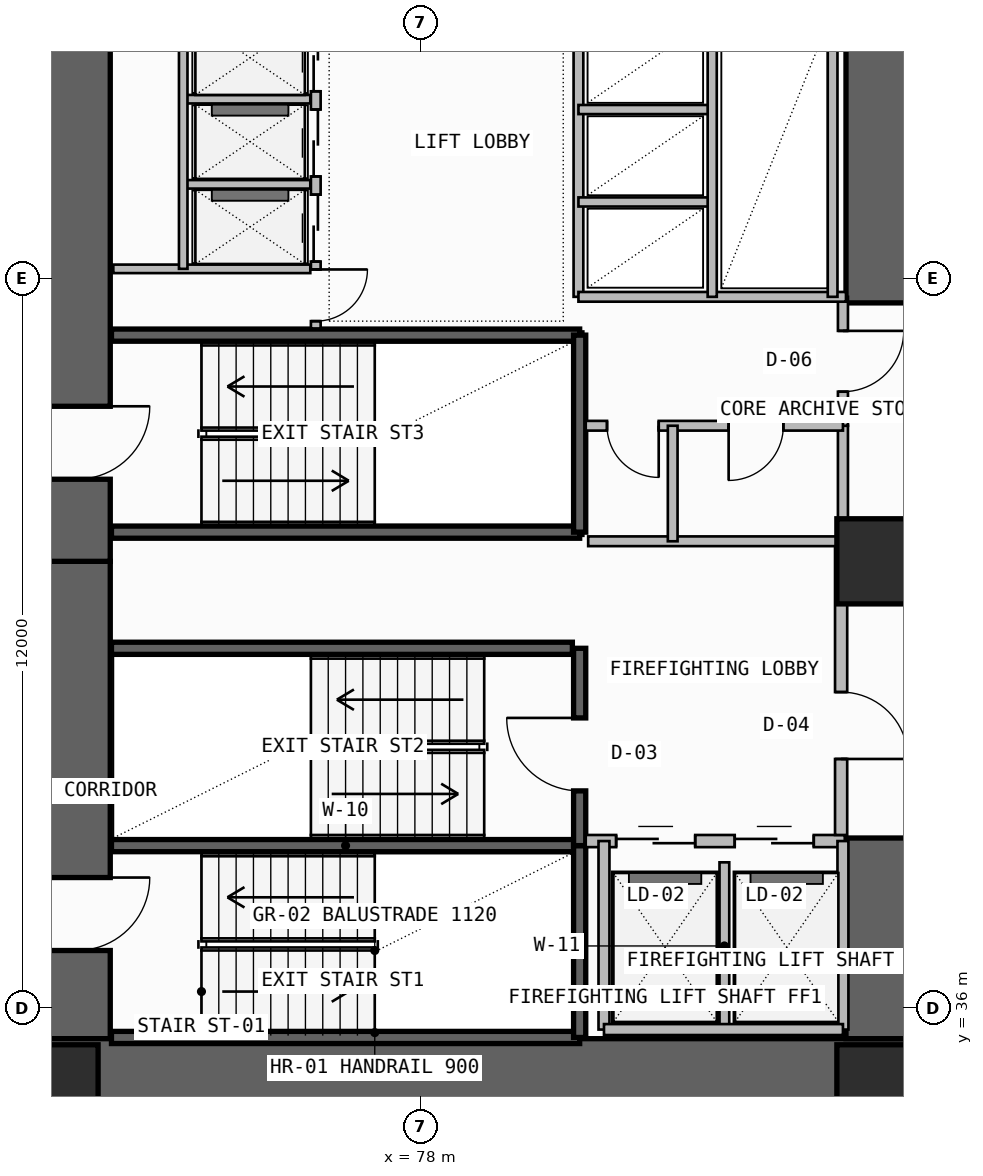
"""IFC4 building model, lengths in metres.
Left out: names, types, materials, properties, quantities, classifications, styles, units other than length and angle.
Written with IfcOpenShell. Run it as: python <this file> out.ifc"""

import sys

from ifc_helpers import new_model, si_unit, direction, frame, frame_2d, origin, origin_2d, place, context, subcontext, project, spatial, rectangle, extrude, element, fill, save


model = new_model("IFC4")
c1 = context("Model", 3, precision=1e-05, world=origin(), true_north=direction((0.0, 1.0)))
c2 = subcontext(c1, "Body", "Model", "MODEL_VIEW")
j1 = project(units=[si_unit("LENGTHUNIT", "METRE"), si_unit("PLANEANGLEUNIT", "RADIAN")], contexts=[c1])
p1 = place(None, origin())
s1 = spatial("IfcSite", under=j1, at=p1, CompositionType="ELEMENT")
p2 = place(p1, origin())
s2 = spatial("IfcBuilding", under=s1, at=p2, CompositionType="ELEMENT")
p3 = place(p2, frame((0.0, 0.0, 51.9)))
s3 = spatial("IfcBuildingStorey", under=s2, at=p3, CompositionType="ELEMENT", Elevation=51.9)
p4 = place(p3, frame((72.35, 35.5, -0.2), z_axis=(0.0, 0.0, 1.0), x_axis=(0.0, 1.0, 0.0)))
e1 = element("IfcWall", 1, at=p4, inside=s3, PredefinedType="SHEAR", context=c2, shape_type="SweptSolid", body=[
    extrude(rectangle(XDim=7.85, YDim=1.1, at=frame_2d((3.925, 0.0))), origin(), (0.0, 0.0, 1.0), 3.6),
])
p5 = place(p4, frame((1.45, 0.0, 0.2)))
e2 = element("IfcOpeningElement", 2, at=p5, cuts=e1, PredefinedType="OPENING", context=c2, shape_type="SweptSolid", body=[
    extrude(rectangle(XDim=1.2, YDim=2.2, at=frame_2d((0.6, 1.1))), frame((0.0, 0.56, 0.0), z_axis=(0.0, -1.0, 0.0), x_axis=(1.0, 0.0, 0.0)), (0.0, 0.0, 1.0), 1.12),
])
p6 = place(p3, frame((71.8, 34.95, -0.2), z_axis=(0.0, 0.0, 1.0), x_axis=(1.0, 0.0, 0.0)))
e3 = element("IfcWall", 3, at=p6, inside=s3, PredefinedType="SHEAR", context=c2, shape_type="SweptSolid", body=[
    extrude(rectangle(XDim=14.3, YDim=1.1, at=frame_2d((7.15, 0.0))), origin(), (0.0, 0.0, 1.0), 3.6),
])
p7 = place(p3, frame((85.55, 35.5, -0.2), z_axis=(0.0, 0.0, 1.0), x_axis=(0.0, 1.0, 0.0)))
e4 = element("IfcWall", 4, at=p7, inside=s3, PredefinedType="SHEAR", context=c2, shape_type="SweptSolid", body=[
    extrude(rectangle(XDim=3.3, YDim=1.1, at=frame_2d((1.65, 0.0))), origin(), (0.0, 0.0, 1.0), 3.6),
])
p8 = place(p3, frame((72.35, 43.35, -0.2), z_axis=(0.0, 0.0, 1.0), x_axis=(0.0, 1.0, 0.0)))
e5 = element("IfcWall", 5, at=p8, inside=s3, PredefinedType="SHEAR", context=c2, shape_type="SweptSolid", body=[
    extrude(rectangle(XDim=12.7, YDim=1.1, at=frame_2d((6.35, 0.0))), origin(), (0.0, 0.0, 1.0), 3.6),
])
p9 = place(p8, frame((1.35, 0.0, 0.2)))
e6 = element("IfcOpeningElement", 6, at=p9, cuts=e5, PredefinedType="OPENING", context=c2, shape_type="SweptSolid", body=[
    extrude(rectangle(XDim=1.2, YDim=2.2, at=frame_2d((0.6, 1.1))), frame((0.0, 0.56, 0.0), z_axis=(0.0, -1.0, 0.0), x_axis=(1.0, 0.0, 0.0)), (0.0, 0.0, 1.0), 1.12),
])
p10 = place(p3, frame((85.55, 47.6, -0.2), z_axis=(0.0, 0.0, 1.0), x_axis=(0.0, 1.0, 0.0)))
e7 = element("IfcWall", 7, at=p10, inside=s3, PredefinedType="SHEAR", context=c2, shape_type="SweptSolid", body=[
    extrude(rectangle(XDim=8.45, YDim=1.1, at=frame_2d((4.225, 0.0))), origin(), (0.0, 0.0, 1.0), 3.6),
])
for number, where, z_axis, x_axis in (
    (8, (72.0, 34.7, 0.0), (0.0, 0.0, 1.0), (1.0, 0.0, 0.0)),
    (9, (85.55, 34.7, 0.0), (0.0, 0.0, 1.0), (1.0, 0.0, 0.0)),
    (10, (85.55, 43.35, 0.0), (0.0, 0.0, 1.0), (1.0, 0.0, 0.0)),
):
    element("IfcColumn", number, at=place(p3, frame(where, z_axis=z_axis, x_axis=x_axis)), inside=s3, PredefinedType="COLUMN", context=c2, shape_type="SweptSolid", body=[
        extrude(rectangle(XDim=1.4, YDim=1.4, at=origin_2d()), origin(), (0.0, 0.0, 1.0), 3.6),
    ])
for number, where, z_axis, x_axis in (
    (11, (72.92, 35.52, -0.2), (0.0, 0.0, 1.0), (1.0, 0.0, 0.0)),
    (12, (72.92, 38.675, -0.2), (0.0, 0.0, 1.0), (1.0, 0.0, 0.0)),
):
    element("IfcWall", number, at=place(p3, frame(where, z_axis=z_axis, x_axis=x_axis)), inside=s3, PredefinedType="SOLIDWALL", context=c2, shape_type="SweptSolid", body=[
        extrude(rectangle(XDim=7.7, YDim=0.2, at=frame_2d((3.85, 0.0))), origin(), (0.0, 0.0, 1.0), 3.6),
    ])
p11 = place(p3, frame((80.62, 35.52, -0.2), z_axis=(0.0, 0.0, 1.0), x_axis=(0.0, 1.0, 0.0)))
e13 = element("IfcWall", 13, at=p11, inside=s3, PredefinedType="SOLIDWALL", context=c2, shape_type="SweptSolid", body=[
    extrude(rectangle(XDim=3.155, YDim=0.2, at=frame_2d((1.578, 0.0))), origin(), (0.0, 0.0, 1.0), 3.6),
])
p12 = place(p3, frame((80.62, 38.675, -0.2), z_axis=(0.0, 0.0, 1.0), x_axis=(0.0, 1.0, 0.0)))
e14 = element("IfcWall", 14, at=p12, inside=s3, PredefinedType="SOLIDWALL", context=c2, shape_type="SweptSolid", body=[
    extrude(rectangle(XDim=3.245, YDim=0.2, at=frame_2d((1.623, 0.0))), origin(), (0.0, 0.0, 1.0), 3.6),
])
p13 = place(p12, frame((0.9, 0.0, 0.2)))
e15 = element("IfcOpeningElement", 15, at=p13, cuts=e14, PredefinedType="OPENING", context=c2, shape_type="SweptSolid", body=[
    extrude(rectangle(XDim=1.2, YDim=2.2, at=frame_2d((0.6, 1.1))), frame((0.0, 0.11, 0.0), z_axis=(0.0, -1.0, 0.0), x_axis=(1.0, 0.0, 0.0)), (0.0, 0.0, 1.0), 0.22),
])
p14 = place(p3, frame((80.72, 38.75, 0.0), z_axis=(0.0, 0.0, 1.0), x_axis=(1.0, 0.0, 0.0)))
e16 = element("IfcWall", 16, at=p14, inside=s3, PredefinedType="SOLIDWALL", context=c2, shape_type="SweptSolid", body=[
    extrude(rectangle(XDim=4.26, YDim=0.2, at=frame_2d((2.13, 0.0))), origin(), (0.0, 0.0, 1.0), 3.4),
])
p15 = place(p14, frame((0.5, 0.0, 0.0)))
e17 = element("IfcOpeningElement", 17, at=p15, cuts=e16, PredefinedType="OPENING", context=c2, shape_type="SweptSolid", body=[
    extrude(rectangle(XDim=1.3, YDim=2.3, at=frame_2d((0.65, 1.15))), frame((0.0, 0.11, 0.0), z_axis=(0.0, -1.0, 0.0), x_axis=(1.0, 0.0, 0.0)), (0.0, 0.0, 1.0), 0.22),
])
p16 = place(p14, frame((2.45, 0.0, 0.0)))
e18 = element("IfcOpeningElement", 18, at=p16, cuts=e16, PredefinedType="OPENING", context=c2, shape_type="SweptSolid", body=[
    extrude(rectangle(XDim=1.3, YDim=2.3, at=frame_2d((0.65, 1.15))), frame((0.0, 0.11, 0.0), z_axis=(0.0, -1.0, 0.0), x_axis=(1.0, 0.0, 0.0)), (0.0, 0.0, 1.0), 0.22),
])
p17 = place(p3, frame((83.0, 35.65, 0.0), z_axis=(0.0, 0.0, 1.0), x_axis=(0.0, 1.0, 0.0)))
e19 = element("IfcWall", 19, at=p17, inside=s3, PredefinedType="PLUMBINGWALL", context=c2, shape_type="SweptSolid", body=[
    extrude(rectangle(XDim=2.75, YDim=0.16, at=frame_2d((1.375, 0.0))), origin(), (0.0, 0.0, 1.0), 3.4),
])
for number, where, z_axis, x_axis in (
    (20, (84.95, 35.65, 0.0), (0.0, 0.0, 1.0), (0.0, 1.0, 0.0)),
    (21, (81.02, 35.65, 0.0), (0.0, 0.0, 1.0), (0.0, 1.0, 0.0)),
):
    element("IfcWall", number, at=place(p3, frame(where, z_axis=z_axis, x_axis=x_axis)), inside=s3, PredefinedType="SOLIDWALL", context=c2, shape_type="SweptSolid", body=[
        extrude(rectangle(XDim=3.1, YDim=0.18, at=frame_2d((1.55, 0.0))), origin(), (0.0, 0.0, 1.0), 3.4),
    ])
p18 = place(p3, frame((81.02, 35.65, 0.0), z_axis=(0.0, 0.0, 1.0), x_axis=(1.0, 0.0, 0.0)))
e22 = element("IfcWall", 22, at=p18, inside=s3, PredefinedType="SOLIDWALL", context=c2, shape_type="SweptSolid", body=[
    extrude(rectangle(XDim=3.93, YDim=0.18, at=frame_2d((1.965, 0.0))), origin(), (0.0, 0.0, 1.0), 3.4),
])
p19 = place(p3, frame((84.92, 38.85, 0.0), z_axis=(0.0, 0.0, 1.0), x_axis=(0.0, 1.0, 0.0)))
e23 = element("IfcWall", 23, at=p19, inside=s3, PredefinedType="SOLIDWALL", context=c2, shape_type="SweptSolid", body=[
    extrude(rectangle(XDim=4.83, YDim=0.2, at=frame_2d((2.415, 0.0))), origin(), (0.0, 0.0, 1.0), 3.4),
])
p20 = place(p19, frame((1.25, 0.0, 0.0)))
e24 = element("IfcOpeningElement", 24, at=p20, cuts=e23, PredefinedType="OPENING", context=c2, shape_type="SweptSolid", body=[
    extrude(rectangle(XDim=1.1, YDim=2.2, at=frame_2d((0.55, 1.1))), frame((0.0, 0.11, 0.0), z_axis=(0.0, -1.0, 0.0), x_axis=(1.0, 0.0, 0.0)), (0.0, 0.0, 1.0), 0.22),
])
p21 = place(p3, frame((72.92, 41.92, -0.2), z_axis=(0.0, 0.0, 1.0), x_axis=(1.0, 0.0, 0.0)))
e25 = element("IfcWall", 25, at=p21, inside=s3, PredefinedType="SOLIDWALL", context=c2, shape_type="SweptSolid", body=[
    extrude(rectangle(XDim=7.58, YDim=0.2, at=frame_2d((3.79, 0.0))), origin(), (0.0, 0.0, 1.0), 3.6),
])
for number, where, z_axis, x_axis in (
    (26, (72.92, 43.83, -0.2), (0.0, 0.0, 1.0), (1.0, 0.0, 0.0)),
    (27, (72.92, 47.07, -0.2), (0.0, 0.0, 1.0), (1.0, 0.0, 0.0)),
):
    element("IfcWall", number, at=place(p3, frame(where, z_axis=z_axis, x_axis=x_axis)), inside=s3, PredefinedType="SOLIDWALL", context=c2, shape_type="SweptSolid", body=[
        extrude(rectangle(XDim=7.7, YDim=0.2, at=frame_2d((3.85, 0.0))), origin(), (0.0, 0.0, 1.0), 3.6),
    ])
p22 = place(p3, frame((80.62, 43.83, -0.2), z_axis=(0.0, 0.0, 1.0), x_axis=(0.0, 1.0, 0.0)))
e28 = element("IfcWall", 28, at=p22, inside=s3, PredefinedType="SOLIDWALL", context=c2, shape_type="SweptSolid", body=[
    extrude(rectangle(XDim=3.24, YDim=0.2, at=frame_2d((1.62, 0.0))), origin(), (0.0, 0.0, 1.0), 3.6),
])
p23 = place(p3, frame((84.95, 43.68, 0.0), z_axis=(0.0, 0.0, 1.0), x_axis=(0.0, 1.0, 0.0)))
e29 = element("IfcWall", 29, at=p23, inside=s3, PredefinedType="PLUMBINGWALL", context=c2, shape_type="SweptSolid", body=[
    extrude(rectangle(XDim=1.9, YDim=0.165, at=frame_2d((0.95, 0.0))), origin(), (0.0, 0.0, 1.0), 3.4),
])
p24 = place(p3, frame((84.95, 45.58, 0.0), z_axis=(0.0, 0.0, 1.0), x_axis=(0.0, 1.0, 0.0)))
e30 = element("IfcWall", 30, at=p24, inside=s3, PredefinedType="PARTITIONING", context=c2, shape_type="SweptSolid", body=[
    extrude(rectangle(XDim=2.12, YDim=0.165, at=frame_2d((1.06, 0.0))), origin(), (0.0, 0.0, 1.0), 3.4),
])
p25 = place(p24, frame((0.56, 0.0, 0.0)))
e31 = element("IfcOpeningElement", 31, at=p25, cuts=e30, PredefinedType="OPENING", context=c2, shape_type="SweptSolid", body=[
    extrude(rectangle(XDim=1.0, YDim=2.2, at=frame_2d((0.5, 1.1))), frame((0.0, 0.093, 0.0), z_axis=(0.0, -1.0, 0.0), x_axis=(1.0, 0.0, 0.0)), (0.0, 0.0, 1.0), 0.185),
])
p26 = place(p3, frame((80.72, 45.58, 0.0), z_axis=(0.0, 0.0, 1.0), x_axis=(1.0, 0.0, 0.0)))
e32 = element("IfcWall", 32, at=p26, inside=s3, PredefinedType="PLUMBINGWALL", context=c2, shape_type="SweptSolid", body=[
    extrude(rectangle(XDim=4.23, YDim=0.16, at=frame_2d((2.115, 0.0))), origin(), (0.0, 0.0, 1.0), 3.4),
])
p27 = place(p26, frame((0.35, 0.0, 0.0)))
e33 = element("IfcOpeningElement", 33, at=p27, cuts=e32, PredefinedType="OPENING", context=c2, shape_type="SweptSolid", body=[
    extrude(rectangle(XDim=0.85, YDim=2.05, at=frame_2d((0.425, 1.025))), frame((0.0, 0.09, 0.0), z_axis=(0.0, -1.0, 0.0), x_axis=(1.0, 0.0, 0.0)), (0.0, 0.0, 1.0), 0.18),
])
p28 = place(p26, frame((2.35, 0.0, 0.0)))
e34 = element("IfcOpeningElement", 34, at=p28, cuts=e32, PredefinedType="OPENING", context=c2, shape_type="SweptSolid", body=[
    extrude(rectangle(XDim=0.9, YDim=2.1, at=frame_2d((0.45, 1.05))), frame((0.0, 0.09, 0.0), z_axis=(0.0, -1.0, 0.0), x_axis=(1.0, 0.0, 0.0)), (0.0, 0.0, 1.0), 0.18),
])
p29 = place(p3, frame((80.76, 43.68, 0.0), z_axis=(0.0, 0.0, 1.0), x_axis=(1.0, 0.0, 0.0)))
e35 = element("IfcWall", 35, at=p29, inside=s3, PredefinedType="PLUMBINGWALL", context=c2, shape_type="SweptSolid", body=[
    extrude(rectangle(XDim=4.19, YDim=0.16, at=frame_2d((2.095, 0.0))), origin(), (0.0, 0.0, 1.0), 3.4),
])
p30 = place(p3, frame((82.15, 43.68, 0.0), z_axis=(0.0, 0.0, 1.0), x_axis=(0.0, 1.0, 0.0)))
e36 = element("IfcWall", 36, at=p30, inside=s3, PredefinedType="PLUMBINGWALL", context=c2, shape_type="SweptSolid", body=[
    extrude(rectangle(XDim=1.9, YDim=0.16, at=frame_2d((0.95, 0.0))), origin(), (0.0, 0.0, 1.0), 3.4),
])
p31 = place(p3, frame((76.28, 47.18, 0.0), z_axis=(0.0, 0.0, 1.0), x_axis=(0.0, 1.0, 0.0)))
e37 = element("IfcWall", 37, at=p31, inside=s3, PredefinedType="SOLIDWALL", context=c2, shape_type="SweptSolid", body=[
    extrude(rectangle(XDim=5.14, YDim=0.16, at=frame_2d((2.57, 0.0))), origin(), (0.0, 0.0, 1.0), 3.4),
])
p32 = place(p31, frame((1.1, 0.0, 0.0)))
e38 = element("IfcOpeningElement", 38, at=p32, cuts=e37, PredefinedType="OPENING", context=c2, shape_type="SweptSolid", body=[
    extrude(rectangle(XDim=1.1, YDim=2.25, at=frame_2d((0.55, 1.125))), frame((0.0, 0.09, 0.0), z_axis=(0.0, -1.0, 0.0), x_axis=(1.0, 0.0, 0.0)), (0.0, 0.0, 1.0), 0.18),
])
p33 = place(p31, frame((2.5, 0.0, 0.0)))
e39 = element("IfcOpeningElement", 39, at=p33, cuts=e37, PredefinedType="OPENING", context=c2, shape_type="SweptSolid", body=[
    extrude(rectangle(XDim=1.1, YDim=2.25, at=frame_2d((0.55, 1.125))), frame((0.0, 0.09, 0.0), z_axis=(0.0, -1.0, 0.0), x_axis=(1.0, 0.0, 0.0)), (0.0, 0.0, 1.0), 0.18),
])
p34 = place(p31, frame((3.9, 0.0, 0.0)))
e40 = element("IfcOpeningElement", 40, at=p34, cuts=e37, PredefinedType="OPENING", context=c2, shape_type="SweptSolid", body=[
    extrude(rectangle(XDim=1.1, YDim=2.25, at=frame_2d((0.55, 1.125))), frame((0.0, 0.09, 0.0), z_axis=(0.0, -1.0, 0.0), x_axis=(1.0, 0.0, 0.0)), (0.0, 0.0, 1.0), 0.18),
])
p35 = place(p31, frame((0.12, 0.0, 0.0)))
e41 = element("IfcOpeningElement", 41, at=p35, cuts=e37, PredefinedType="OPENING", context=c2, shape_type="SweptSolid", body=[
    extrude(rectangle(XDim=0.85, YDim=2.05, at=frame_2d((0.425, 1.025))), frame((0.0, 0.09, 0.0), z_axis=(0.0, -1.0, 0.0), x_axis=(1.0, 0.0, 0.0)), (0.0, 0.0, 1.0), 0.18),
])
p36 = place(p3, frame((72.95, 48.16, 0.0), z_axis=(0.0, 0.0, 1.0), x_axis=(1.0, 0.0, 0.0)))
e42 = element("IfcWall", 42, at=p36, inside=s3, PredefinedType="PLUMBINGWALL", context=c2, shape_type="SweptSolid", body=[
    extrude(rectangle(XDim=3.24, YDim=0.14, at=frame_2d((1.62, 0.0))), origin(), (0.0, 0.0, 1.0), 3.4),
])
for number, where, z_axis, x_axis in (
    (43, (74.15, 49.55, 0.0), (0.0, 0.0, 1.0), (1.0, 0.0, 0.0)),
    (44, (74.15, 50.95, 0.0), (0.0, 0.0, 1.0), (1.0, 0.0, 0.0)),
):
    element("IfcWall", number, at=place(p3, frame(where, z_axis=z_axis, x_axis=x_axis)), inside=s3, PredefinedType="PLUMBINGWALL", context=c2, shape_type="SweptSolid", body=[
        extrude(rectangle(XDim=2.04, YDim=0.14, at=frame_2d((1.02, 0.0))), origin(), (0.0, 0.0, 1.0), 3.4),
    ])
p37 = place(p3, frame((74.1, 48.16, 0.0), z_axis=(0.0, 0.0, 1.0), x_axis=(0.0, 1.0, 0.0)))
e45 = element("IfcWall", 45, at=p37, inside=s3, PredefinedType="PLUMBINGWALL", context=c2, shape_type="SweptSolid", body=[
    extrude(rectangle(XDim=4.16, YDim=0.14, at=frame_2d((2.08, 0.0))), origin(), (0.0, 0.0, 1.0), 3.4),
])
p38 = place(p3, frame((80.6, 47.7, 0.0), z_axis=(0.0, 0.0, 1.0), x_axis=(0.0, 1.0, 0.0)))
e46 = element("IfcWall", 46, at=p38, inside=s3, PredefinedType="SOLIDWALL", context=c2, shape_type="SweptSolid", body=[
    extrude(rectangle(XDim=4.6, YDim=0.16, at=frame_2d((2.3, 0.0))), origin(), (0.0, 0.0, 1.0), 3.4),
])
p39 = place(p3, frame((80.6, 47.7, 0.0), z_axis=(0.0, 0.0, 1.0), x_axis=(1.0, 0.0, 0.0)))
e47 = element("IfcWall", 47, at=p39, inside=s3, PredefinedType="SOLIDWALL", context=c2, shape_type="SweptSolid", body=[
    extrude(rectangle(XDim=4.4, YDim=0.16, at=frame_2d((2.2, 0.0))), origin(), (0.0, 0.0, 1.0), 3.4),
])
for number, where, z_axis, x_axis in (
    (48, (80.6, 49.26, 0.0), (0.0, 0.0, 1.0), (1.0, 0.0, 0.0)),
    (49, (80.6, 50.78, 0.0), (0.0, 0.0, 1.0), (1.0, 0.0, 0.0)),
):
    element("IfcWall", number, at=place(p3, frame(where, z_axis=z_axis, x_axis=x_axis)), inside=s3, PredefinedType="PLUMBINGWALL", context=c2, shape_type="SweptSolid", body=[
        extrude(rectangle(XDim=2.2, YDim=0.15, at=frame_2d((1.1, 0.0))), origin(), (0.0, 0.0, 1.0), 3.4),
    ])
p40 = place(p3, frame((82.8, 47.7, 0.0), z_axis=(0.0, 0.0, 1.0), x_axis=(0.0, 1.0, 0.0)))
e50 = element("IfcWall", 50, at=p40, inside=s3, PredefinedType="PLUMBINGWALL", context=c2, shape_type="SweptSolid", body=[
    extrude(rectangle(XDim=4.6, YDim=0.15, at=frame_2d((2.3, 0.0))), origin(), (0.0, 0.0, 1.0), 3.4),
])
p41 = place(p3, frame((84.78, 47.7, 0.0), z_axis=(0.0, 0.0, 1.0), x_axis=(0.0, 1.0, 0.0)))
e51 = element("IfcWall", 51, at=p41, inside=s3, PredefinedType="SOLIDWALL", context=c2, shape_type="SweptSolid", body=[
    extrude(rectangle(XDim=4.6, YDim=0.16, at=frame_2d((2.3, 0.0))), origin(), (0.0, 0.0, 1.0), 3.4),
])
p42 = place(p5, frame((1.2, 0.0, 0.0), z_axis=(0.0, 0.0, 1.0), x_axis=(-1.0, 0.0, 0.0)))
e52 = element("IfcDoor", 52, at=p42, inside=s3, OperationType="SINGLE_SWING_LEFT", PredefinedType="USERDEFINED", context=c2, shape_type="SweptSolid", body=[
    extrude(rectangle(XDim=1.2, YDim=2.2, at=frame_2d((0.6, 1.1))), frame((0.0, 0.025, 0.0), z_axis=(0.0, -1.0, 0.0), x_axis=(1.0, 0.0, 0.0)), (0.0, 0.0, 1.0), 0.05),
])
fill(e2, e52)
p43 = place(p13, origin())
e53 = element("IfcDoor", 53, at=p43, inside=s3, OperationType="SINGLE_SWING_RIGHT", PredefinedType="USERDEFINED", context=c2, shape_type="SweptSolid", body=[
    extrude(rectangle(XDim=1.2, YDim=2.2, at=frame_2d((0.6, 1.1))), frame((0.0, 0.025, 0.0), z_axis=(0.0, -1.0, 0.0), x_axis=(1.0, 0.0, 0.0)), (0.0, 0.0, 1.0), 0.05),
])
fill(e15, e53)
p44 = place(p15, origin())
e54 = element("IfcDoor", 54, at=p44, inside=s3, OperationType="DOUBLE_DOOR_SLIDING", PredefinedType="DOOR", context=c2, shape_type="SweptSolid", body=[
    extrude(rectangle(XDim=1.3, YDim=2.3, at=frame_2d((0.65, 1.15))), frame((0.0, 0.025, 0.0), z_axis=(0.0, -1.0, 0.0), x_axis=(1.0, 0.0, 0.0)), (0.0, 0.0, 1.0), 0.05),
])
fill(e17, e54)
p45 = place(p16, origin())
e55 = element("IfcDoor", 55, at=p45, inside=s3, OperationType="DOUBLE_DOOR_SLIDING", PredefinedType="DOOR", context=c2, shape_type="SweptSolid", body=[
    extrude(rectangle(XDim=1.3, YDim=2.3, at=frame_2d((0.65, 1.15))), frame((0.0, 0.025, 0.0), z_axis=(0.0, -1.0, 0.0), x_axis=(1.0, 0.0, 0.0)), (0.0, 0.0, 1.0), 0.05),
])
fill(e18, e55)
p46 = place(p20, frame((1.1, 0.0, 0.0), z_axis=(0.0, 0.0, 1.0), x_axis=(-1.0, 0.0, 0.0)))
e56 = element("IfcDoor", 56, at=p46, inside=s3, OperationType="SINGLE_SWING_RIGHT", PredefinedType="DOOR", context=c2, shape_type="SweptSolid", body=[
    extrude(rectangle(XDim=1.1, YDim=2.2, at=frame_2d((0.55, 1.1))), frame((0.0, 0.025, 0.0), z_axis=(0.0, -1.0, 0.0), x_axis=(1.0, 0.0, 0.0)), (0.0, 0.0, 1.0), 0.05),
])
fill(e24, e56)
p47 = place(p9, frame((1.2, 0.0, 0.0), z_axis=(0.0, 0.0, 1.0), x_axis=(-1.0, 0.0, 0.0)))
e57 = element("IfcDoor", 57, at=p47, inside=s3, OperationType="SINGLE_SWING_LEFT", PredefinedType="USERDEFINED", context=c2, shape_type="SweptSolid", body=[
    extrude(rectangle(XDim=1.2, YDim=2.2, at=frame_2d((0.6, 1.1))), frame((0.0, 0.025, 0.0), z_axis=(0.0, -1.0, 0.0), x_axis=(1.0, 0.0, 0.0)), (0.0, 0.0, 1.0), 0.05),
])
fill(e6, e57)
p48 = place(p25, frame((1.0, 0.0, 0.0), z_axis=(0.0, 0.0, 1.0), x_axis=(-1.0, 0.0, 0.0)))
e58 = element("IfcDoor", 58, at=p48, inside=s3, OperationType="SINGLE_SWING_LEFT", PredefinedType="DOOR", context=c2, shape_type="SweptSolid", body=[
    extrude(rectangle(XDim=1.0, YDim=2.2, at=frame_2d((0.5, 1.1))), frame((0.0, 0.025, 0.0), z_axis=(0.0, -1.0, 0.0), x_axis=(1.0, 0.0, 0.0)), (0.0, 0.0, 1.0), 0.05),
])
fill(e31, e58)
p49 = place(p27, frame((0.85, 0.0, 0.0), z_axis=(0.0, 0.0, 1.0), x_axis=(-1.0, 0.0, 0.0)))
e59 = element("IfcDoor", 59, at=p49, inside=s3, OperationType="SINGLE_SWING_LEFT", PredefinedType="DOOR", context=c2, shape_type="SweptSolid", body=[
    extrude(rectangle(XDim=0.85, YDim=2.05, at=frame_2d((0.425, 1.025))), frame((0.0, 0.025, 0.0), z_axis=(0.0, -1.0, 0.0), x_axis=(1.0, 0.0, 0.0)), (0.0, 0.0, 1.0), 0.05),
])
fill(e33, e59)
p50 = place(p28, frame((0.9, 0.0, 0.0), z_axis=(0.0, 0.0, 1.0), x_axis=(-1.0, 0.0, 0.0)))
e60 = element("IfcDoor", 60, at=p50, inside=s3, OperationType="SINGLE_SWING_RIGHT", PredefinedType="DOOR", context=c2, shape_type="SweptSolid", body=[
    extrude(rectangle(XDim=0.9, YDim=2.1, at=frame_2d((0.45, 1.05))), frame((0.0, 0.025, 0.0), z_axis=(0.0, -1.0, 0.0), x_axis=(1.0, 0.0, 0.0)), (0.0, 0.0, 1.0), 0.05),
])
fill(e34, e60)
p51 = place(p32, origin())
e61 = element("IfcDoor", 61, at=p51, inside=s3, OperationType="DOUBLE_DOOR_SLIDING", PredefinedType="DOOR", context=c2, shape_type="SweptSolid", body=[
    extrude(rectangle(XDim=1.1, YDim=2.25, at=frame_2d((0.55, 1.125))), frame((0.0, 0.025, 0.0), z_axis=(0.0, -1.0, 0.0), x_axis=(1.0, 0.0, 0.0)), (0.0, 0.0, 1.0), 0.05),
])
fill(e38, e61)
p52 = place(p33, origin())
e62 = element("IfcDoor", 62, at=p52, inside=s3, OperationType="DOUBLE_DOOR_SLIDING", PredefinedType="DOOR", context=c2, shape_type="SweptSolid", body=[
    extrude(rectangle(XDim=1.1, YDim=2.25, at=frame_2d((0.55, 1.125))), frame((0.0, 0.025, 0.0), z_axis=(0.0, -1.0, 0.0), x_axis=(1.0, 0.0, 0.0)), (0.0, 0.0, 1.0), 0.05),
])
fill(e39, e62)
p53 = place(p34, origin())
e63 = element("IfcDoor", 63, at=p53, inside=s3, OperationType="DOUBLE_DOOR_SLIDING", PredefinedType="DOOR", context=c2, shape_type="SweptSolid", body=[
    extrude(rectangle(XDim=1.1, YDim=2.25, at=frame_2d((0.55, 1.125))), frame((0.0, 0.025, 0.0), z_axis=(0.0, -1.0, 0.0), x_axis=(1.0, 0.0, 0.0)), (0.0, 0.0, 1.0), 0.05),
])
fill(e40, e63)
p54 = place(p35, frame((0.85, 0.0, 0.0), z_axis=(0.0, 0.0, 1.0), x_axis=(-1.0, 0.0, 0.0)))
e64 = element("IfcDoor", 64, at=p54, inside=s3, OperationType="SINGLE_SWING_LEFT", PredefinedType="DOOR", context=c2, shape_type="SweptSolid", body=[
    extrude(rectangle(XDim=0.85, YDim=2.05, at=frame_2d((0.425, 1.025))), frame((0.0, 0.025, 0.0), z_axis=(0.0, -1.0, 0.0), x_axis=(1.0, 0.0, 0.0)), (0.0, 0.0, 1.0), 0.05),
])
fill(e41, e64)
save(model, sys.argv[1])
